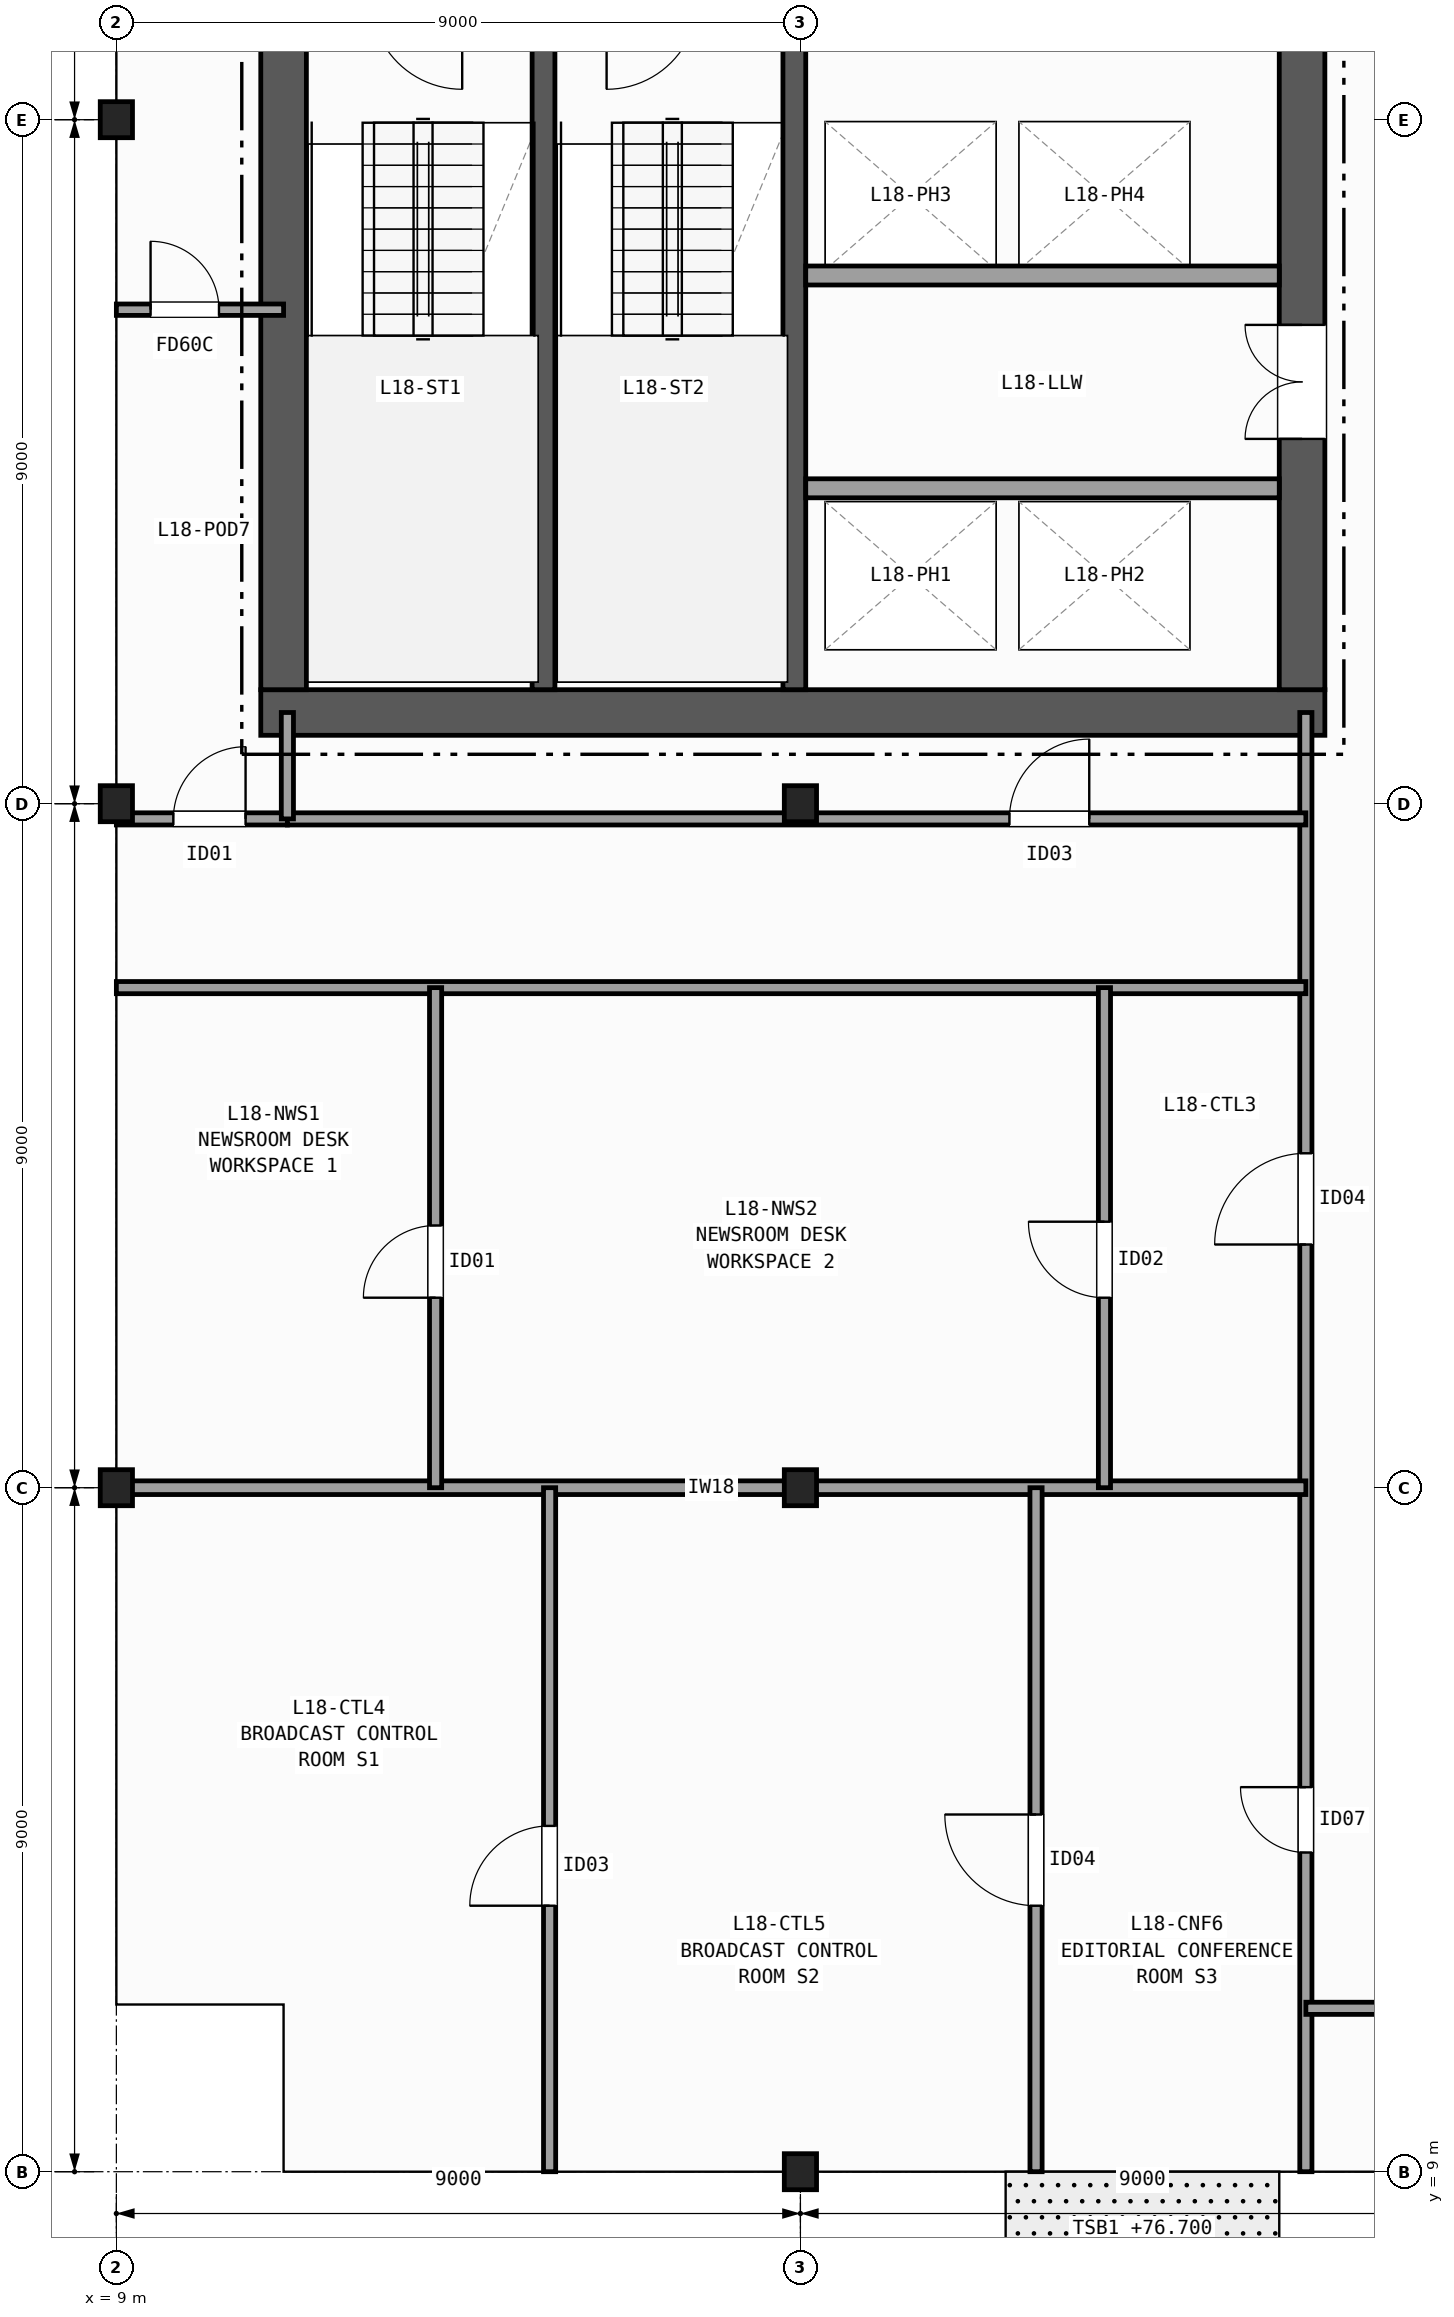
"""IFC4 building model, lengths in metres.
Left out: names, types, materials, properties, quantities, classifications, styles, units other than length and angle.
Written with IfcOpenShell. Run it as: python <this file> out.ifc"""

import sys

from ifc_helpers import new_model, si_unit, direction, frame, frame_2d, origin, origin_2d, place, context, subcontext, project, spatial, rectangle, i_section, extrude, element, fill, save


model = new_model("IFC4")
c1 = context("Model", 3, precision=1e-05, world=origin(), true_north=direction((0.0, 1.0)))
c2 = subcontext(c1, "Body", "Model", "MODEL_VIEW")
j1 = project(units=[si_unit("LENGTHUNIT", "METRE"), si_unit("PLANEANGLEUNIT", "RADIAN")], contexts=[c1])
p1 = place(None, origin())
s1 = spatial("IfcSite", under=j1, at=p1, CompositionType="ELEMENT")
p2 = place(p1, origin())
s2 = spatial("IfcBuilding", under=s1, at=p2, CompositionType="ELEMENT")
p3 = place(p2, frame((0.0, 0.0, 76.7)))
s3 = spatial("IfcBuildingStorey", under=s2, at=p3, CompositionType="ELEMENT", Elevation=76.7)
for number, where, z_axis, x_axis in (
    (1, (9.0, 18.0, 0.0), (0.0, 0.0, 1.0), (1.0, 0.0, 0.0)),
    (2, (9.0, 27.0, 0.0), (0.0, 0.0, 1.0), (1.0, 0.0, 0.0)),
    (3, (9.0, 36.0, 0.0), (0.0, 0.0, 1.0), (1.0, 0.0, 0.0)),
    (4, (18.0, 9.0, 0.0), (0.0, 0.0, 1.0), (1.0, 0.0, 0.0)),
    (5, (18.0, 18.0, 0.0), (0.0, 0.0, 1.0), (1.0, 0.0, 0.0)),
    (6, (18.0, 27.0, 0.0), (0.0, 0.0, 1.0), (1.0, 0.0, 0.0)),
):
    element("IfcColumn", number, at=place(p3, frame(where, z_axis=z_axis, x_axis=x_axis)), inside=s3, PredefinedType="COLUMN", context=c2, shape_type="SweptSolid", body=[
        extrude(i_section(OverallWidth=0.424, OverallDepth=0.474, WebThickness=0.048, FlangeThickness=0.077, FilletRadius=0.015, at=origin_2d()), origin(), (0.0, 0.0, 1.0), 3.7),
    ])
p4 = place(p3, frame((10.9, 28.2, 0.0), z_axis=(0.0, 0.0, 1.0), x_axis=(1.0, 0.0, 0.0)))
e7 = element("IfcWall", 7, at=p4, inside=s3, PredefinedType="SHEAR", context=c2, shape_type="SweptSolid", body=[
    extrude(rectangle(XDim=14.0, YDim=0.6, at=frame_2d((7.0, 0.0))), origin(), (0.0, 0.0, 1.0), 3.42),
])
p5 = place(p3, frame((11.2, 42.1, 0.0), z_axis=(0.0, 0.0, 1.0), x_axis=(0.0, -1.0, 0.0)))
e8 = element("IfcWall", 8, at=p5, inside=s3, PredefinedType="SHEAR", context=c2, shape_type="SweptSolid", body=[
    extrude(rectangle(XDim=13.6, YDim=0.6, at=frame_2d((6.8, 0.0))), origin(), (0.0, 0.0, 1.0), 3.42),
])
p6 = place(p3, frame((24.6, 28.5, 0.0), z_axis=(0.0, 0.0, 1.0), x_axis=(0.0, 1.0, 0.0)))
e9 = element("IfcWall", 9, at=p6, inside=s3, PredefinedType="SHEAR", context=c2, shape_type="SweptSolid", body=[
    extrude(rectangle(XDim=13.6, YDim=0.6, at=frame_2d((6.8, 0.0))), origin(), (0.0, 0.0, 1.0), 3.42),
])
p7 = place(p6, frame((3.3, 0.0, 0.0)))
e10 = element("IfcOpeningElement", 10, at=p7, cuts=e9, PredefinedType="OPENING", context=c2, shape_type="SweptSolid", body=[
    extrude(rectangle(XDim=1.5, YDim=2.2, at=frame_2d((0.75, 1.1))), frame((0.0, 0.31, 0.0), z_axis=(0.0, -1.0, 0.0), x_axis=(1.0, 0.0, 0.0)), (0.0, 0.0, 1.0), 0.62),
])
p8 = place(p6, frame((9.9, 0.0, 0.0)))
e11 = element("IfcOpeningElement", 11, at=p8, cuts=e9, PredefinedType="OPENING", context=c2, shape_type="SweptSolid", body=[
    extrude(rectangle(XDim=0.9, YDim=2.1, at=frame_2d((0.45, 1.05))), frame((0.0, 0.31, 0.0), z_axis=(0.0, -1.0, 0.0), x_axis=(1.0, 0.0, 0.0)), (0.0, 0.0, 1.0), 0.62),
])
p9 = place(p6, frame((12.0, 0.0, 0.0)))
e12 = element("IfcOpeningElement", 12, at=p9, cuts=e9, PredefinedType="OPENING", context=c2, shape_type="SweptSolid", body=[
    extrude(rectangle(XDim=0.9, YDim=2.1, at=frame_2d((0.45, 1.05))), frame((0.0, 0.31, 0.0), z_axis=(0.0, -1.0, 0.0), x_axis=(1.0, 0.0, 0.0)), (0.0, 0.0, 1.0), 0.62),
])
p10 = place(p3, frame((14.62, 28.5, 0.0), z_axis=(0.0, 0.0, 1.0), x_axis=(0.0, 1.0, 0.0)))
e13 = element("IfcWall", 13, at=p10, inside=s3, PredefinedType="SHEAR", context=c2, shape_type="SweptSolid", body=[
    extrude(rectangle(XDim=8.95, YDim=0.3, at=frame_2d((4.475, 0.0))), origin(), (0.0, 0.0, 1.0), 3.42),
])
p11 = place(p3, frame((17.92, 42.1, 0.0), z_axis=(0.0, 0.0, 1.0), x_axis=(0.0, -1.0, 0.0)))
e14 = element("IfcWall", 14, at=p11, inside=s3, PredefinedType="SHEAR", context=c2, shape_type="SweptSolid", body=[
    extrude(rectangle(XDim=13.6, YDim=0.3, at=frame_2d((6.8, 0.0))), origin(), (0.0, 0.0, 1.0), 3.42),
])
p12 = place(p11, frame((1.925, 0.0, 0.0)))
e15 = element("IfcOpeningElement", 15, at=p12, cuts=e14, PredefinedType="OPENING", context=c2, shape_type="SweptSolid", body=[
    extrude(rectangle(XDim=1.15, YDim=2.15, at=frame_2d((0.575, 1.075))), frame((0.0, 0.16, 0.0), z_axis=(0.0, -1.0, 0.0), x_axis=(1.0, 0.0, 0.0)), (0.0, 0.0, 1.0), 0.32),
])
for number, where, z_axis, x_axis in (
    (16, (18.07, 31.15, 0.0), (0.0, 0.0, 1.0), (1.0, 0.0, 0.0)),
    (17, (24.3, 33.95, 0.0), (0.0, 0.0, 1.0), (-1.0, 0.0, 0.0)),
):
    element("IfcWall", number, at=place(p3, frame(where, z_axis=z_axis, x_axis=x_axis)), inside=s3, PredefinedType="PARTITIONING", context=c2, shape_type="SweptSolid", body=[
        extrude(rectangle(XDim=6.23, YDim=0.25, at=frame_2d((3.115, 0.0))), origin(), (0.0, 0.0, 1.0), 3.42),
    ])
p13 = place(p3, frame((9.0, 26.8, 0.0), z_axis=(0.0, 0.0, 1.0), x_axis=(1.0, 0.0, 0.0)))
e18 = element("IfcWall", 18, at=p13, inside=s3, PredefinedType="PARTITIONING", context=c2, shape_type="SweptSolid", body=[
    extrude(rectangle(XDim=2.25, YDim=0.16, at=frame_2d((1.125, 0.0))), origin(), (0.0, 0.0, 1.0), 2.627),
])
p14 = place(p13, frame((0.75, 0.0, 0.0)))
e19 = element("IfcOpeningElement", 19, at=p14, cuts=e18, PredefinedType="OPENING", context=c2, shape_type="SweptSolid", body=[
    extrude(rectangle(XDim=0.95, YDim=2.1, at=frame_2d((0.475, 1.05))), frame((0.0, 0.09, 0.0), z_axis=(0.0, -1.0, 0.0), x_axis=(1.0, 0.0, 0.0)), (0.0, 0.0, 1.0), 0.18),
])
p15 = place(p3, frame((9.0, 33.5, 0.0), z_axis=(0.0, 0.0, 1.0), x_axis=(1.0, 0.0, 0.0)))
e20 = element("IfcWall", 20, at=p15, inside=s3, PredefinedType="PARTITIONING", context=c2, shape_type="SweptSolid", body=[
    extrude(rectangle(XDim=2.2, YDim=0.15, at=frame_2d((1.1, 0.0))), origin(), (0.0, 0.0, 1.0), 2.627),
])
p16 = place(p15, frame((0.45, 0.0, 0.0)))
e21 = element("IfcOpeningElement", 21, at=p16, cuts=e20, PredefinedType="OPENING", context=c2, shape_type="SweptSolid", body=[
    extrude(rectangle(XDim=0.9, YDim=2.1, at=frame_2d((0.45, 1.05))), frame((0.0, 0.085, 0.0), z_axis=(0.0, -1.0, 0.0), x_axis=(1.0, 0.0, 0.0)), (0.0, 0.0, 1.0), 0.17),
])
p17 = place(p3, frame((24.65, 9.0, 0.0), z_axis=(0.0, 0.0, 1.0), x_axis=(0.0, 1.0, 0.0)))
e22 = element("IfcWall", 22, at=p17, inside=s3, PredefinedType="PARTITIONING", context=c2, shape_type="SweptSolid", body=[
    extrude(rectangle(XDim=19.2, YDim=0.16, at=frame_2d((9.6, 0.0))), origin(), (0.0, 0.0, 1.0), 2.627),
])
p18 = place(p17, frame((12.2, 0.0, 0.0)))
e23 = element("IfcOpeningElement", 23, at=p18, cuts=e22, PredefinedType="OPENING", context=c2, shape_type="SweptSolid", body=[
    extrude(rectangle(XDim=1.2, YDim=2.15, at=frame_2d((0.6, 1.075))), frame((0.0, 0.09, 0.0), z_axis=(0.0, -1.0, 0.0), x_axis=(1.0, 0.0, 0.0)), (0.0, 0.0, 1.0), 0.18),
])
p19 = place(p17, frame((4.2, 0.0, 0.0)))
e24 = element("IfcOpeningElement", 24, at=p19, cuts=e22, PredefinedType="OPENING", context=c2, shape_type="SweptSolid", body=[
    extrude(rectangle(XDim=0.86, YDim=2.05, at=frame_2d((0.43, 1.025))), frame((0.0, 0.09, 0.0), z_axis=(0.0, -1.0, 0.0), x_axis=(1.0, 0.0, 0.0)), (0.0, 0.0, 1.0), 0.18),
])
p20 = place(p3, frame((9.0, 24.58, 0.0), z_axis=(0.0, 0.0, 1.0), x_axis=(1.0, 0.0, 0.0)))
e25 = element("IfcWall", 25, at=p20, inside=s3, PredefinedType="PARTITIONING", context=c2, shape_type="SweptSolid", body=[
    extrude(rectangle(XDim=15.65, YDim=0.16, at=frame_2d((7.825, 0.0))), origin(), (0.0, 0.0, 1.0), 2.627),
])
p21 = place(p3, frame((11.25, 26.8, 0.0), z_axis=(0.0, 0.0, 1.0), x_axis=(1.0, 0.0, 0.0)))
e26 = element("IfcWall", 26, at=p21, inside=s3, PredefinedType="PARTITIONING", context=c2, shape_type="SweptSolid", body=[
    extrude(rectangle(XDim=13.4, YDim=0.16, at=frame_2d((6.7, 0.0))), origin(), (0.0, 0.0, 1.0), 2.789),
])
p22 = place(p21, frame((9.5, 0.0, 0.0)))
e27 = element("IfcOpeningElement", 27, at=p22, cuts=e26, PredefinedType="OPENING", context=c2, shape_type="SweptSolid", body=[
    extrude(rectangle(XDim=1.05, YDim=2.15, at=frame_2d((0.525, 1.075))), frame((0.0, 0.09, 0.0), z_axis=(0.0, -1.0, 0.0), x_axis=(1.0, 0.0, 0.0)), (0.0, 0.0, 1.0), 0.18),
])
p23 = place(p3, frame((11.25, 26.8, 0.0), z_axis=(0.0, 0.0, 1.0), x_axis=(0.0, 1.0, 0.0)))
e28 = element("IfcWall", 28, at=p23, inside=s3, PredefinedType="PARTITIONING", context=c2, shape_type="SweptSolid", body=[
    extrude(rectangle(XDim=1.4, YDim=0.16, at=frame_2d((0.7, 0.0))), origin(), (0.0, 0.0, 1.0), 2.789),
])
p24 = place(p3, frame((9.0, 18.0, 0.0), z_axis=(0.0, 0.0, 1.0), x_axis=(1.0, 0.0, 0.0)))
e29 = element("IfcWall", 29, at=p24, inside=s3, PredefinedType="PARTITIONING", context=c2, shape_type="SweptSolid", body=[
    extrude(rectangle(XDim=15.65, YDim=0.18, at=frame_2d((7.825, 0.0))), origin(), (0.0, 0.0, 1.0), 2.627),
])
p25 = place(p3, frame((13.2, 18.0, 0.0), z_axis=(0.0, 0.0, 1.0), x_axis=(0.0, 1.0, 0.0)))
e30 = element("IfcWall", 30, at=p25, inside=s3, PredefinedType="PARTITIONING", context=c2, shape_type="SweptSolid", body=[
    extrude(rectangle(XDim=6.58, YDim=0.16, at=frame_2d((3.29, 0.0))), origin(), (0.0, 0.0, 1.0), 2.789),
])
p26 = place(p25, frame((2.5, 0.0, 0.0)))
e31 = element("IfcOpeningElement", 31, at=p26, cuts=e30, PredefinedType="OPENING", context=c2, shape_type="SweptSolid", body=[
    extrude(rectangle(XDim=0.95, YDim=2.1, at=frame_2d((0.475, 1.05))), frame((0.0, 0.09, 0.0), z_axis=(0.0, -1.0, 0.0), x_axis=(1.0, 0.0, 0.0)), (0.0, 0.0, 1.0), 0.18),
])
p27 = place(p3, frame((22.0, 18.0, 0.0), z_axis=(0.0, 0.0, 1.0), x_axis=(0.0, 1.0, 0.0)))
e32 = element("IfcWall", 32, at=p27, inside=s3, PredefinedType="PARTITIONING", context=c2, shape_type="SweptSolid", body=[
    extrude(rectangle(XDim=6.58, YDim=0.16, at=frame_2d((3.29, 0.0))), origin(), (0.0, 0.0, 1.0), 2.789),
])
p28 = place(p27, frame((2.5, 0.0, 0.0)))
e33 = element("IfcOpeningElement", 33, at=p28, cuts=e32, PredefinedType="OPENING", context=c2, shape_type="SweptSolid", body=[
    extrude(rectangle(XDim=1.0, YDim=2.1, at=frame_2d((0.5, 1.05))), frame((0.0, 0.09, 0.0), z_axis=(0.0, -1.0, 0.0), x_axis=(1.0, 0.0, 0.0)), (0.0, 0.0, 1.0), 0.18),
])
p29 = place(p3, frame((14.7, 9.0, 0.0), z_axis=(0.0, 0.0, 1.0), x_axis=(0.0, 1.0, 0.0)))
e34 = element("IfcWall", 34, at=p29, inside=s3, PredefinedType="PARTITIONING", context=c2, shape_type="SweptSolid", body=[
    extrude(rectangle(XDim=9.0, YDim=0.16, at=frame_2d((4.5, 0.0))), origin(), (0.0, 0.0, 1.0), 2.789),
])
p30 = place(p29, frame((3.5, 0.0, 0.0)))
e35 = element("IfcOpeningElement", 35, at=p30, cuts=e34, PredefinedType="OPENING", context=c2, shape_type="SweptSolid", body=[
    extrude(rectangle(XDim=1.05, YDim=2.15, at=frame_2d((0.525, 1.075))), frame((0.0, 0.09, 0.0), z_axis=(0.0, -1.0, 0.0), x_axis=(1.0, 0.0, 0.0)), (0.0, 0.0, 1.0), 0.18),
])
p31 = place(p3, frame((21.1, 9.0, 0.0), z_axis=(0.0, 0.0, 1.0), x_axis=(0.0, 1.0, 0.0)))
e36 = element("IfcWall", 36, at=p31, inside=s3, PredefinedType="PARTITIONING", context=c2, shape_type="SweptSolid", body=[
    extrude(rectangle(XDim=9.0, YDim=0.16, at=frame_2d((4.5, 0.0))), origin(), (0.0, 0.0, 1.0), 2.627),
])
p32 = place(p31, frame((3.5, 0.0, 0.0)))
e37 = element("IfcOpeningElement", 37, at=p32, cuts=e36, PredefinedType="OPENING", context=c2, shape_type="SweptSolid", body=[
    extrude(rectangle(XDim=1.2, YDim=2.15, at=frame_2d((0.6, 1.075))), frame((0.0, 0.09, 0.0), z_axis=(0.0, -1.0, 0.0), x_axis=(1.0, 0.0, 0.0)), (0.0, 0.0, 1.0), 0.18),
])
p33 = place(p3, frame((24.65, 11.15, 0.0), z_axis=(0.0, 0.0, 1.0), x_axis=(1.0, 0.0, 0.0)))
e38 = element("IfcWall", 38, at=p33, inside=s3, PredefinedType="PARTITIONING", context=c2, shape_type="SweptSolid", body=[
    extrude(rectangle(XDim=4.75, YDim=0.16, at=frame_2d((2.375, 0.0))), origin(), (0.0, 0.0, 1.0), 2.792),
])
p34 = place(p33, frame((1.2, 0.0, 0.0)))
e39 = element("IfcOpeningElement", 39, at=p34, cuts=e38, PredefinedType="OPENING", context=c2, shape_type="SweptSolid", body=[
    extrude(rectangle(XDim=1.05, YDim=2.15, at=frame_2d((0.525, 1.075))), frame((0.0, 0.09, 0.0), z_axis=(0.0, -1.0, 0.0), x_axis=(1.0, 0.0, 0.0)), (0.0, 0.0, 1.0), 0.18),
])
p35 = place(p7, origin())
e40 = element("IfcDoor", 40, at=p35, inside=s3, OperationType="DOUBLE_DOOR_SINGLE_SWING", PredefinedType="DOOR", context=c2, shape_type="SweptSolid", body=[
    extrude(rectangle(XDim=1.5, YDim=2.2, at=frame_2d((0.75, 1.1))), frame((0.0, 0.025, 0.0), z_axis=(0.0, -1.0, 0.0), x_axis=(1.0, 0.0, 0.0)), (0.0, 0.0, 1.0), 0.05),
])
fill(e10, e40)
p36 = place(p14, origin())
e41 = element("IfcDoor", 41, at=p36, inside=s3, OperationType="SINGLE_SWING_RIGHT", PredefinedType="DOOR", context=c2, shape_type="SweptSolid", body=[
    extrude(rectangle(XDim=0.95, YDim=2.1, at=frame_2d((0.475, 1.05))), frame((0.0, 0.025, 0.0), z_axis=(0.0, -1.0, 0.0), x_axis=(1.0, 0.0, 0.0)), (0.0, 0.0, 1.0), 0.05),
])
fill(e19, e41)
p37 = place(p16, origin())
e42 = element("IfcDoor", 42, at=p37, inside=s3, OperationType="SINGLE_SWING_LEFT", PredefinedType="DOOR", context=c2, shape_type="SweptSolid", body=[
    extrude(rectangle(XDim=0.9, YDim=2.1, at=frame_2d((0.45, 1.05))), frame((0.0, 0.025, 0.0), z_axis=(0.0, -1.0, 0.0), x_axis=(1.0, 0.0, 0.0)), (0.0, 0.0, 1.0), 0.05),
])
fill(e21, e42)
p38 = place(p22, origin())
e43 = element("IfcDoor", 43, at=p38, inside=s3, OperationType="SINGLE_SWING_RIGHT", PredefinedType="DOOR", context=c2, shape_type="SweptSolid", body=[
    extrude(rectangle(XDim=1.05, YDim=2.15, at=frame_2d((0.525, 1.075))), frame((0.0, 0.025, 0.0), z_axis=(0.0, -1.0, 0.0), x_axis=(1.0, 0.0, 0.0)), (0.0, 0.0, 1.0), 0.05),
])
fill(e27, e43)
p39 = place(p18, origin())
e44 = element("IfcDoor", 44, at=p39, inside=s3, OperationType="SINGLE_SWING_LEFT", PredefinedType="DOOR", context=c2, shape_type="SweptSolid", body=[
    extrude(rectangle(XDim=1.2, YDim=2.15, at=frame_2d((0.6, 1.075))), frame((0.0, 0.025, 0.0), z_axis=(0.0, -1.0, 0.0), x_axis=(1.0, 0.0, 0.0)), (0.0, 0.0, 1.0), 0.05),
])
fill(e23, e44)
p40 = place(p19, origin())
e45 = element("IfcDoor", 45, at=p40, inside=s3, OperationType="SINGLE_SWING_RIGHT", PredefinedType="DOOR", context=c2, shape_type="SweptSolid", body=[
    extrude(rectangle(XDim=0.86, YDim=2.05, at=frame_2d((0.43, 1.025))), frame((0.0, 0.025, 0.0), z_axis=(0.0, -1.0, 0.0), x_axis=(1.0, 0.0, 0.0)), (0.0, 0.0, 1.0), 0.05),
])
fill(e24, e45)
p41 = place(p26, origin())
e46 = element("IfcDoor", 46, at=p41, inside=s3, OperationType="SINGLE_SWING_LEFT", PredefinedType="DOOR", context=c2, shape_type="SweptSolid", body=[
    extrude(rectangle(XDim=0.95, YDim=2.1, at=frame_2d((0.475, 1.05))), frame((0.0, 0.025, 0.0), z_axis=(0.0, -1.0, 0.0), x_axis=(1.0, 0.0, 0.0)), (0.0, 0.0, 1.0), 0.05),
])
fill(e31, e46)
p42 = place(p28, origin())
e47 = element("IfcDoor", 47, at=p42, inside=s3, OperationType="SINGLE_SWING_RIGHT", PredefinedType="DOOR", context=c2, shape_type="SweptSolid", body=[
    extrude(rectangle(XDim=1.0, YDim=2.1, at=frame_2d((0.5, 1.05))), frame((0.0, 0.025, 0.0), z_axis=(0.0, -1.0, 0.0), x_axis=(1.0, 0.0, 0.0)), (0.0, 0.0, 1.0), 0.05),
])
fill(e33, e47)
p43 = place(p30, origin())
e48 = element("IfcDoor", 48, at=p43, inside=s3, OperationType="SINGLE_SWING_LEFT", PredefinedType="DOOR", context=c2, shape_type="SweptSolid", body=[
    extrude(rectangle(XDim=1.05, YDim=2.15, at=frame_2d((0.525, 1.075))), frame((0.0, 0.025, 0.0), z_axis=(0.0, -1.0, 0.0), x_axis=(1.0, 0.0, 0.0)), (0.0, 0.0, 1.0), 0.05),
])
fill(e35, e48)
p44 = place(p32, origin())
e49 = element("IfcDoor", 49, at=p44, inside=s3, OperationType="SINGLE_SWING_RIGHT", PredefinedType="DOOR", context=c2, shape_type="SweptSolid", body=[
    extrude(rectangle(XDim=1.2, YDim=2.15, at=frame_2d((0.6, 1.075))), frame((0.0, 0.025, 0.0), z_axis=(0.0, -1.0, 0.0), x_axis=(1.0, 0.0, 0.0)), (0.0, 0.0, 1.0), 0.05),
])
fill(e37, e49)
save(model, sys.argv[1])
